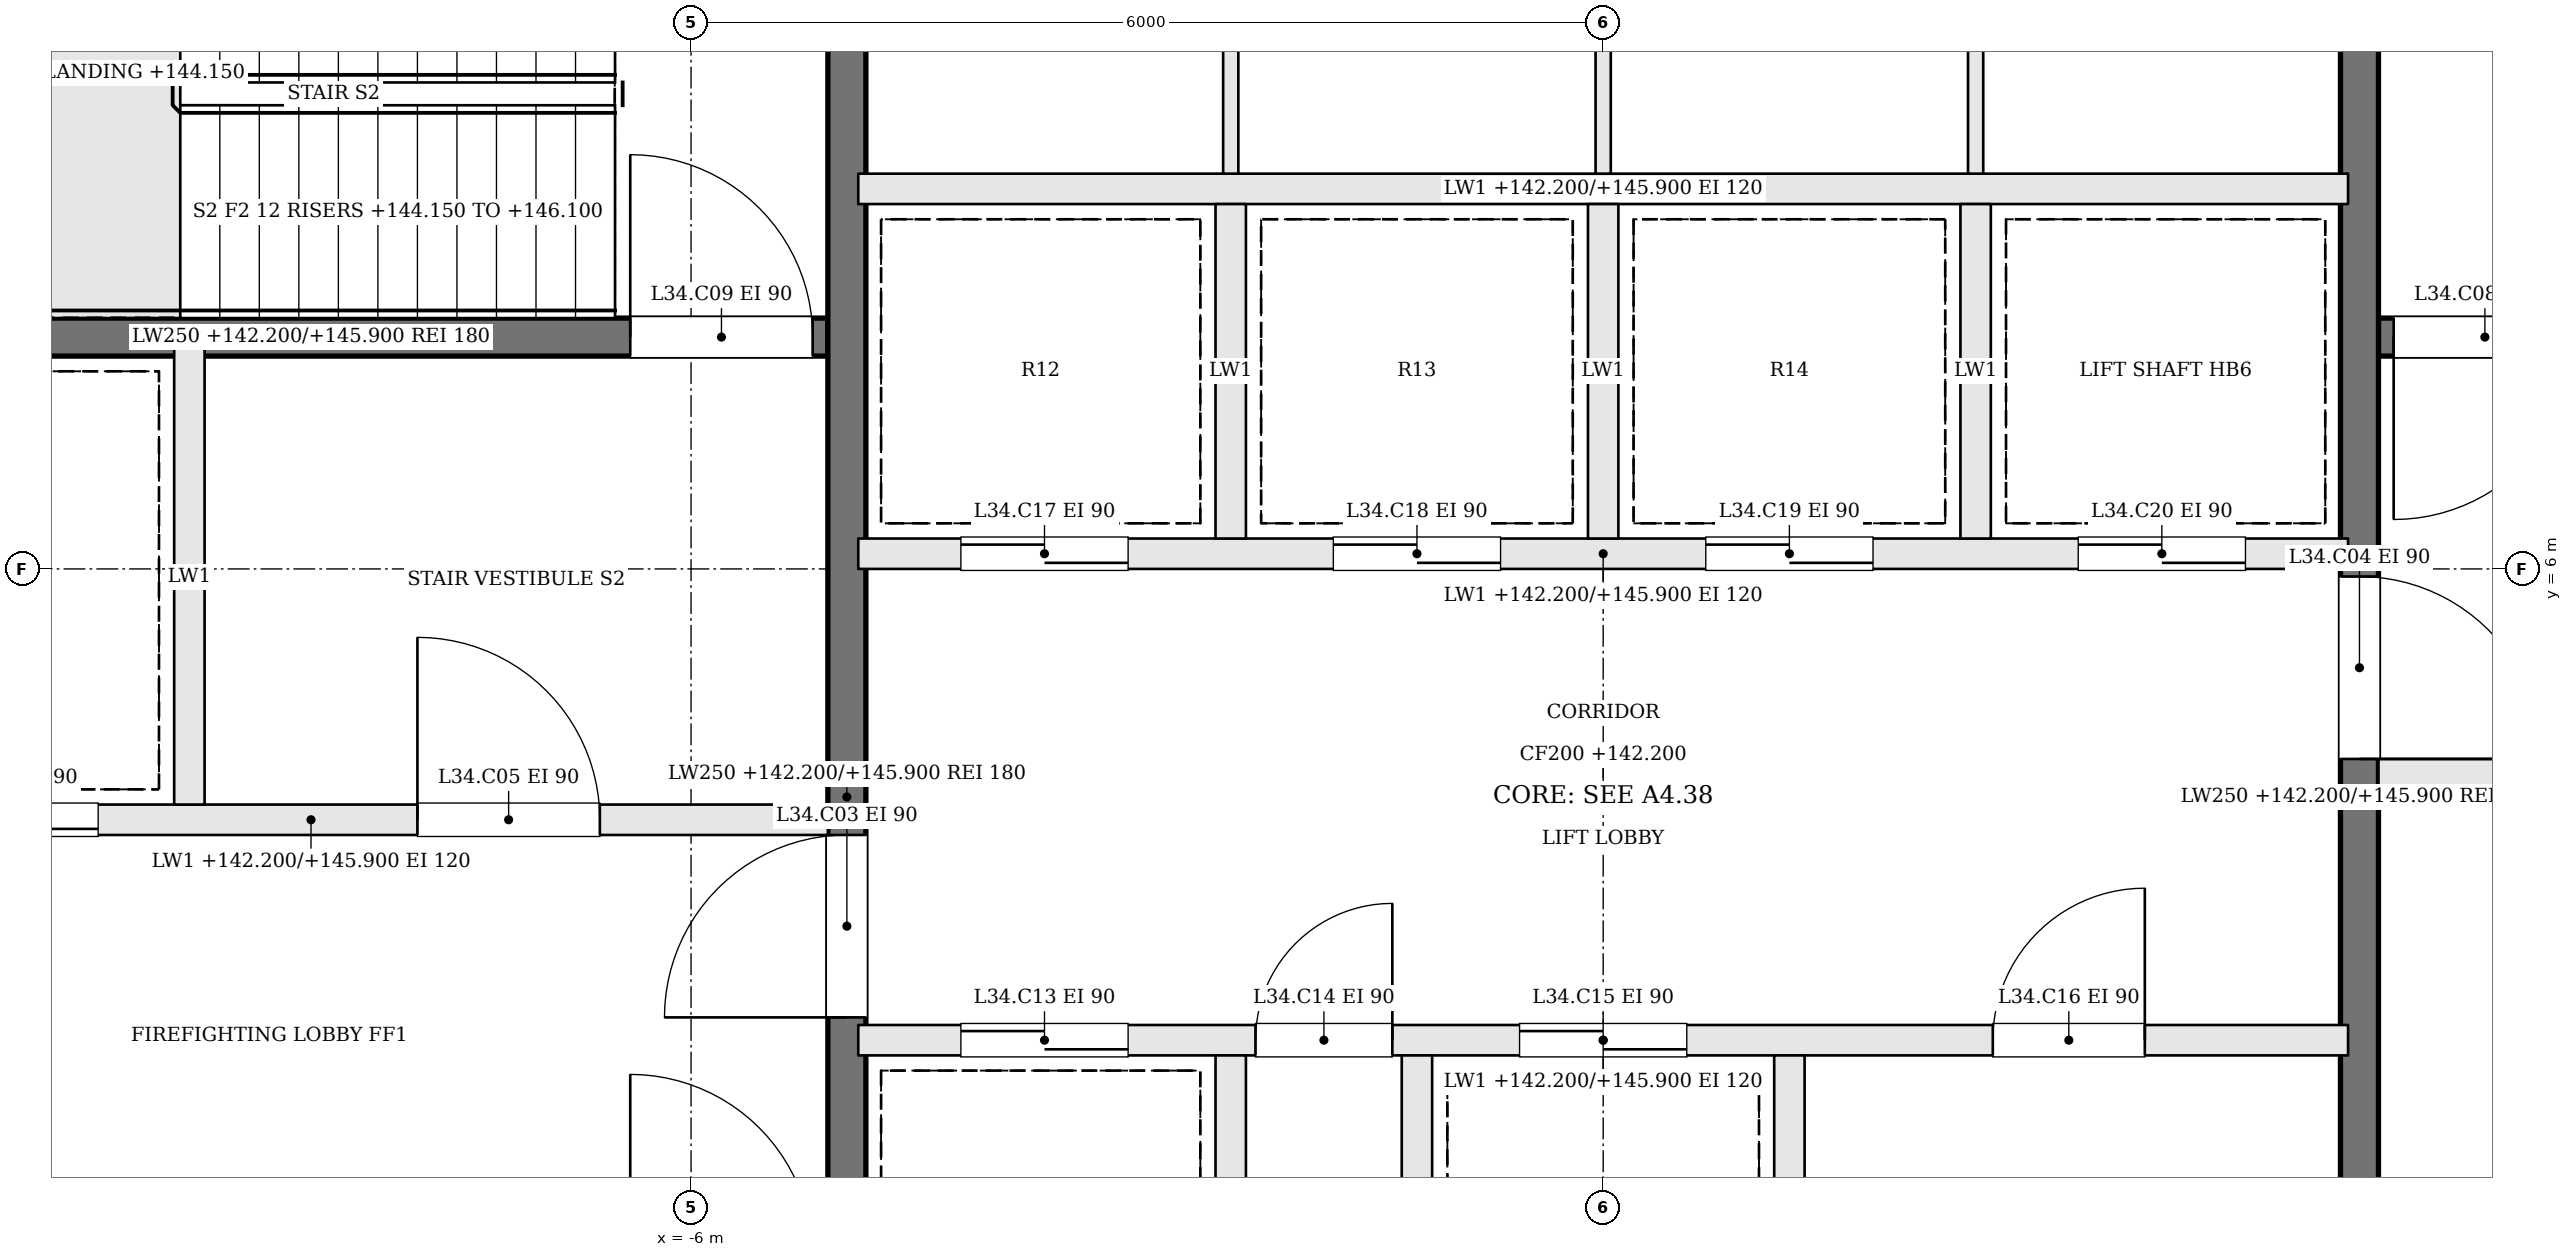
"""IFC4 building model, lengths in metres.
Left out: names, types, materials, properties, quantities, classifications, styles, units other than length and angle.
Written with IfcOpenShell. Run it as: python <this file> out.ifc"""

import sys

from ifc_helpers import new_model, si_unit, direction, frame, frame_2d, origin, place, context, subcontext, project, spatial, rectangle, extrude, element, fill, save


model = new_model("IFC4")
c1 = context("Model", 3, precision=1e-05, world=origin(), true_north=direction((0.0, 1.0)))
c2 = subcontext(c1, "Body", "Model", "MODEL_VIEW")
j1 = project(units=[si_unit("LENGTHUNIT", "METRE"), si_unit("PLANEANGLEUNIT", "RADIAN")], contexts=[c1])
p1 = place(None, origin())
s1 = spatial("IfcSite", under=j1, at=p1, CompositionType="ELEMENT")
p2 = place(p1, origin())
s2 = spatial("IfcBuilding", under=s1, at=p2, CompositionType="ELEMENT")
p3 = place(p2, frame((0.0, 0.0, 142.2)))
s3 = spatial("IfcBuildingStorey", under=s2, at=p3, CompositionType="ELEMENT", Elevation=142.2)
p4 = place(p3, frame((11.9, 7.525, 0.0), z_axis=(0.0, 0.0, 1.0), x_axis=(-1.0, 0.0, 0.0)))
e1 = element("IfcWall", 1, at=p4, inside=s3, PredefinedType="SOLIDWALL", context=c2, shape_type="SweptSolid", body=[
    extrude(rectangle(XDim=6.8, YDim=0.25, at=frame_2d((3.4, 0.0))), origin(), (0.0, 0.0, 1.0), 3.7),
])
p5 = place(p4, frame((5.5, 0.0, 0.0)))
e2 = element("IfcOpeningElement", 2, at=p5, cuts=e1, PredefinedType="OPENING", context=c2, shape_type="SweptSolid", body=[
    extrude(rectangle(XDim=1.2, YDim=2.1, at=frame_2d((0.6, 1.05))), frame((0.0, 0.135, 0.0), z_axis=(0.0, -1.0, 0.0), x_axis=(1.0, 0.0, 0.0)), (0.0, 0.0, 1.0), 0.27),
])
p6 = place(p3, frame((-11.9, 4.35, 0.0), z_axis=(0.0, 0.0, 1.0), x_axis=(1.0, 0.0, 0.0)))
e3 = element("IfcWall", 3, at=p6, inside=s3, PredefinedType="SOLIDWALL", context=c2, shape_type="SweptSolid", body=[
    extrude(rectangle(XDim=6.8, YDim=0.2, at=frame_2d((3.4, 0.0))), origin(), (0.0, 0.0, 1.0), 3.7),
])
p7 = place(p6, frame((4.1, 0.0, 0.0)))
e4 = element("IfcOpeningElement", 4, at=p7, cuts=e3, PredefinedType="OPENING", context=c2, shape_type="SweptSolid", body=[
    extrude(rectangle(XDim=1.2, YDim=2.1, at=frame_2d((0.6, 1.05))), frame((0.0, 0.11, 0.0), z_axis=(0.0, -1.0, 0.0), x_axis=(1.0, 0.0, 0.0)), (0.0, 0.0, 1.0), 0.22),
])
p8 = place(p6, frame((0.8, 0.0, 0.0)))
e5 = element("IfcOpeningElement", 5, at=p8, cuts=e3, PredefinedType="OPENING", context=c2, shape_type="SweptSolid", body=[
    extrude(rectangle(XDim=1.2, YDim=2.1, at=frame_2d((0.6, 1.05))), frame((0.0, 0.11, 0.0), z_axis=(0.0, -1.0, 0.0), x_axis=(1.0, 0.0, 0.0)), (0.0, 0.0, 1.0), 0.22),
])
p9 = place(p3, frame((11.9, 4.65, 0.0), z_axis=(0.0, 0.0, 1.0), x_axis=(-1.0, 0.0, 0.0)))
e6 = element("IfcWall", 6, at=p9, inside=s3, PredefinedType="SOLIDWALL", context=c2, shape_type="SweptSolid", body=[
    extrude(rectangle(XDim=6.8, YDim=0.2, at=frame_2d((3.4, 0.0))), origin(), (0.0, 0.0, 1.0), 3.7),
])
p10 = place(p9, frame((4.1, 0.0, 0.0)))
e7 = element("IfcOpeningElement", 7, at=p10, cuts=e6, PredefinedType="OPENING", context=c2, shape_type="SweptSolid", body=[
    extrude(rectangle(XDim=1.2, YDim=2.1, at=frame_2d((0.6, 1.05))), frame((0.0, 0.11, 0.0), z_axis=(0.0, -1.0, 0.0), x_axis=(1.0, 0.0, 0.0)), (0.0, 0.0, 1.0), 0.22),
])
p11 = place(p9, frame((0.8, 0.0, 0.0)))
e8 = element("IfcOpeningElement", 8, at=p11, cuts=e6, PredefinedType="OPENING", context=c2, shape_type="SweptSolid", body=[
    extrude(rectangle(XDim=1.2, YDim=2.1, at=frame_2d((0.6, 1.05))), frame((0.0, 0.11, 0.0), z_axis=(0.0, -1.0, 0.0), x_axis=(1.0, 0.0, 0.0)), (0.0, 0.0, 1.0), 0.22),
])
p12 = place(p3, frame((-11.9, 7.525, 0.0), z_axis=(0.0, 0.0, 1.0), x_axis=(1.0, 0.0, 0.0)))
e9 = element("IfcWall", 9, at=p12, inside=s3, PredefinedType="SOLIDWALL", context=c2, shape_type="SweptSolid", body=[
    extrude(rectangle(XDim=6.8, YDim=0.25, at=frame_2d((3.4, 0.0))), origin(), (0.0, 0.0, 1.0), 3.7),
])
p13 = place(p12, frame((5.5, 0.0, 0.0)))
e10 = element("IfcOpeningElement", 10, at=p13, cuts=e9, PredefinedType="OPENING", context=c2, shape_type="SweptSolid", body=[
    extrude(rectangle(XDim=1.2, YDim=2.1, at=frame_2d((0.6, 1.05))), frame((0.0, 0.135, 0.0), z_axis=(0.0, -1.0, 0.0), x_axis=(1.0, 0.0, 0.0)), (0.0, 0.0, 1.0), 0.27),
])
p14 = place(p3, frame((-9.3, 4.45, 0.0), z_axis=(0.0, 0.0, 1.0), x_axis=(0.0, 1.0, 0.0)))
e11 = element("IfcWall", 11, at=p14, inside=s3, PredefinedType="SOLIDWALL", context=c2, shape_type="SweptSolid", body=[
    extrude(rectangle(XDim=3.0, YDim=0.2, at=frame_2d((1.5, 0.0))), origin(), (0.0, 0.0, 1.0), 3.7),
])
p15 = place(p3, frame((-4.975, -1.9, 0.0), z_axis=(0.0, 0.0, 1.0), x_axis=(0.0, 1.0, 0.0)))
e12 = element("IfcWall", 12, at=p15, inside=s3, PredefinedType="SOLIDWALL", context=c2, shape_type="SweptSolid", body=[
    extrude(rectangle(XDim=12.8, YDim=0.25, at=frame_2d((6.4, 0.0))), origin(), (0.0, 0.0, 1.0), 3.7),
])
p16 = place(p15, frame((4.95, 0.0, 0.0)))
e13 = element("IfcOpeningElement", 13, at=p16, cuts=e12, PredefinedType="OPENING", context=c2, shape_type="SweptSolid", body=[
    extrude(rectangle(XDim=1.2, YDim=2.1, at=frame_2d((0.6, 1.05))), frame((0.0, 0.135, 0.0), z_axis=(0.0, -1.0, 0.0), x_axis=(1.0, 0.0, 0.0)), (0.0, 0.0, 1.0), 0.27),
])
p17 = place(p3, frame((4.975, 10.9, 0.0), z_axis=(0.0, 0.0, 1.0), x_axis=(0.0, -1.0, 0.0)))
e14 = element("IfcWall", 14, at=p17, inside=s3, PredefinedType="SOLIDWALL", context=c2, shape_type="SweptSolid", body=[
    extrude(rectangle(XDim=12.8, YDim=0.25, at=frame_2d((6.4, 0.0))), origin(), (0.0, 0.0, 1.0), 3.7),
])
p18 = place(p17, frame((4.95, 0.0, 0.0)))
e15 = element("IfcOpeningElement", 15, at=p18, cuts=e14, PredefinedType="OPENING", context=c2, shape_type="SweptSolid", body=[
    extrude(rectangle(XDim=1.2, YDim=2.1, at=frame_2d((0.6, 1.05))), frame((0.0, 0.135, 0.0), z_axis=(0.0, -1.0, 0.0), x_axis=(1.0, 0.0, 0.0)), (0.0, 0.0, 1.0), 0.27),
])
p19 = place(p3, frame((-4.9, 2.9, 0.0), z_axis=(0.0, 0.0, 1.0), x_axis=(1.0, 0.0, 0.0)))
e16 = element("IfcWall", 16, at=p19, inside=s3, PredefinedType="SOLIDWALL", context=c2, shape_type="SweptSolid", body=[
    extrude(rectangle(XDim=9.8, YDim=0.2, at=frame_2d((4.9, 0.0))), origin(), (0.0, 0.0, 1.0), 3.7),
])
p20 = place(p19, frame((0.675, 0.0, 0.0)))
e17 = element("IfcOpeningElement", 17, at=p20, cuts=e16, PredefinedType="OPENING", context=c2, shape_type="SweptSolid", body=[
    extrude(rectangle(XDim=1.1, YDim=2.1, at=frame_2d((0.55, 1.05))), frame((0.0, 0.11, 0.0), z_axis=(0.0, -1.0, 0.0), x_axis=(1.0, 0.0, 0.0)), (0.0, 0.0, 1.0), 0.22),
])
p21 = place(p19, frame((2.613, 0.0, 0.0)))
e18 = element("IfcOpeningElement", 18, at=p21, cuts=e16, PredefinedType="OPENING", context=c2, shape_type="SweptSolid", body=[
    extrude(rectangle(XDim=0.9, YDim=2.1, at=frame_2d((0.45, 1.05))), frame((0.0, 0.11, 0.0), z_axis=(0.0, -1.0, 0.0), x_axis=(1.0, 0.0, 0.0)), (0.0, 0.0, 1.0), 0.22),
])
p22 = place(p19, frame((4.35, 0.0, 0.0)))
e19 = element("IfcOpeningElement", 19, at=p22, cuts=e16, PredefinedType="OPENING", context=c2, shape_type="SweptSolid", body=[
    extrude(rectangle(XDim=1.1, YDim=2.1, at=frame_2d((0.55, 1.05))), frame((0.0, 0.11, 0.0), z_axis=(0.0, -1.0, 0.0), x_axis=(1.0, 0.0, 0.0)), (0.0, 0.0, 1.0), 0.22),
])
p23 = place(p19, frame((7.463, 0.0, 0.0)))
e20 = element("IfcOpeningElement", 20, at=p23, cuts=e16, PredefinedType="OPENING", context=c2, shape_type="SweptSolid", body=[
    extrude(rectangle(XDim=1.0, YDim=2.1, at=frame_2d((0.5, 1.05))), frame((0.0, 0.11, 0.0), z_axis=(0.0, -1.0, 0.0), x_axis=(1.0, 0.0, 0.0)), (0.0, 0.0, 1.0), 0.22),
])
p24 = place(p3, frame((-4.9, 6.1, 0.0), z_axis=(0.0, 0.0, 1.0), x_axis=(1.0, 0.0, 0.0)))
e21 = element("IfcWall", 21, at=p24, inside=s3, PredefinedType="SOLIDWALL", context=c2, shape_type="SweptSolid", body=[
    extrude(rectangle(XDim=9.8, YDim=0.2, at=frame_2d((4.9, 0.0))), origin(), (0.0, 0.0, 1.0), 3.7),
])
p25 = place(p24, frame((0.675, 0.0, 0.0)))
e22 = element("IfcOpeningElement", 22, at=p25, cuts=e21, PredefinedType="OPENING", context=c2, shape_type="SweptSolid", body=[
    extrude(rectangle(XDim=1.1, YDim=2.1, at=frame_2d((0.55, 1.05))), frame((0.0, 0.11, 0.0), z_axis=(0.0, -1.0, 0.0), x_axis=(1.0, 0.0, 0.0)), (0.0, 0.0, 1.0), 0.22),
])
p26 = place(p24, frame((3.125, 0.0, 0.0)))
e23 = element("IfcOpeningElement", 23, at=p26, cuts=e21, PredefinedType="OPENING", context=c2, shape_type="SweptSolid", body=[
    extrude(rectangle(XDim=1.1, YDim=2.1, at=frame_2d((0.55, 1.05))), frame((0.0, 0.11, 0.0), z_axis=(0.0, -1.0, 0.0), x_axis=(1.0, 0.0, 0.0)), (0.0, 0.0, 1.0), 0.22),
])
p27 = place(p24, frame((5.575, 0.0, 0.0)))
e24 = element("IfcOpeningElement", 24, at=p27, cuts=e21, PredefinedType="OPENING", context=c2, shape_type="SweptSolid", body=[
    extrude(rectangle(XDim=1.1, YDim=2.1, at=frame_2d((0.55, 1.05))), frame((0.0, 0.11, 0.0), z_axis=(0.0, -1.0, 0.0), x_axis=(1.0, 0.0, 0.0)), (0.0, 0.0, 1.0), 0.22),
])
p28 = place(p24, frame((8.025, 0.0, 0.0)))
e25 = element("IfcOpeningElement", 25, at=p28, cuts=e21, PredefinedType="OPENING", context=c2, shape_type="SweptSolid", body=[
    extrude(rectangle(XDim=1.1, YDim=2.1, at=frame_2d((0.55, 1.05))), frame((0.0, 0.11, 0.0), z_axis=(0.0, -1.0, 0.0), x_axis=(1.0, 0.0, 0.0)), (0.0, 0.0, 1.0), 0.22),
])
p29 = place(p3, frame((-4.9, 8.5, 0.0), z_axis=(0.0, 0.0, 1.0), x_axis=(1.0, 0.0, 0.0)))
e26 = element("IfcWall", 26, at=p29, inside=s3, PredefinedType="SOLIDWALL", context=c2, shape_type="SweptSolid", body=[
    extrude(rectangle(XDim=9.8, YDim=0.2, at=frame_2d((4.9, 0.0))), origin(), (0.0, 0.0, 1.0), 3.7),
])
for number, where, z_axis, x_axis in (
    (27, (-2.45, 0.6, 0.0), (0.0, 0.0, 1.0), (0.0, 1.0, 0.0)),
    (28, (-1.225, 0.6, 0.0), (0.0, 0.0, 1.0), (0.0, 1.0, 0.0)),
    (29, (1.225, 0.6, 0.0), (0.0, 0.0, 1.0), (0.0, 1.0, 0.0)),
    (30, (-2.45, 6.2, 0.0), (0.0, 0.0, 1.0), (0.0, 1.0, 0.0)),
    (31, (0.0, 6.2, 0.0), (0.0, 0.0, 1.0), (0.0, 1.0, 0.0)),
    (32, (2.45, 6.2, 0.0), (0.0, 0.0, 1.0), (0.0, 1.0, 0.0)),
):
    element("IfcWall", number, at=place(p3, frame(where, z_axis=z_axis, x_axis=x_axis)), inside=s3, PredefinedType="SOLIDWALL", context=c2, shape_type="SweptSolid", body=[
        extrude(rectangle(XDim=2.2, YDim=0.2, at=frame_2d((1.1, 0.0))), origin(), (0.0, 0.0, 1.0), 3.7),
    ])
for number, where, z_axis, x_axis in (
    (33, (-2.45, 8.6, 0.0), (0.0, 0.0, 1.0), (0.0, 1.0, 0.0)),
    (34, (0.0, 8.6, 0.0), (0.0, 0.0, 1.0), (0.0, 1.0, 0.0)),
    (35, (2.45, 8.6, 0.0), (0.0, 0.0, 1.0), (0.0, 1.0, 0.0)),
):
    element("IfcWall", number, at=place(p3, frame(where, z_axis=z_axis, x_axis=x_axis)), inside=s3, PredefinedType="PARTITIONING", context=c2, shape_type="SweptSolid", body=[
        extrude(rectangle(XDim=2.3, YDim=0.1, at=frame_2d((1.15, 0.0))), origin(), (0.0, 0.0, 1.0), 3.7),
    ])
p30 = place(p16, origin())
e36 = element("IfcDoor", 36, at=p30, inside=s3, OperationType="SINGLE_SWING_LEFT", PredefinedType="DOOR", context=c2, shape_type="SweptSolid", body=[
    extrude(rectangle(XDim=1.2, YDim=2.1, at=frame_2d((0.6, 1.05))), frame((0.0, 0.025, 0.0), z_axis=(0.0, -1.0, 0.0), x_axis=(1.0, 0.0, 0.0)), (0.0, 0.0, 1.0), 0.05),
])
fill(e13, e36)
p31 = place(p18, origin())
e37 = element("IfcDoor", 37, at=p31, inside=s3, OperationType="SINGLE_SWING_RIGHT", PredefinedType="DOOR", context=c2, shape_type="SweptSolid", body=[
    extrude(rectangle(XDim=1.2, YDim=2.1, at=frame_2d((0.6, 1.05))), frame((0.0, 0.025, 0.0), z_axis=(0.0, -1.0, 0.0), x_axis=(1.0, 0.0, 0.0)), (0.0, 0.0, 1.0), 0.05),
])
fill(e15, e37)
p32 = place(p7, origin())
e38 = element("IfcDoor", 38, at=p32, inside=s3, OperationType="SINGLE_SWING_LEFT", PredefinedType="DOOR", context=c2, shape_type="SweptSolid", body=[
    extrude(rectangle(XDim=1.2, YDim=2.1, at=frame_2d((0.6, 1.05))), frame((0.0, 0.025, 0.0), z_axis=(0.0, -1.0, 0.0), x_axis=(1.0, 0.0, 0.0)), (0.0, 0.0, 1.0), 0.05),
])
fill(e4, e38)
p33 = place(p5, origin())
e39 = element("IfcDoor", 39, at=p33, inside=s3, OperationType="SINGLE_SWING_RIGHT", PredefinedType="DOOR", context=c2, shape_type="SweptSolid", body=[
    extrude(rectangle(XDim=1.2, YDim=2.1, at=frame_2d((0.6, 1.05))), frame((0.0, 0.025, 0.0), z_axis=(0.0, -1.0, 0.0), x_axis=(1.0, 0.0, 0.0)), (0.0, 0.0, 1.0), 0.05),
])
fill(e2, e39)
p34 = place(p13, origin())
e40 = element("IfcDoor", 40, at=p34, inside=s3, OperationType="SINGLE_SWING_LEFT", PredefinedType="DOOR", context=c2, shape_type="SweptSolid", body=[
    extrude(rectangle(XDim=1.2, YDim=2.1, at=frame_2d((0.6, 1.05))), frame((0.0, 0.025, 0.0), z_axis=(0.0, -1.0, 0.0), x_axis=(1.0, 0.0, 0.0)), (0.0, 0.0, 1.0), 0.05),
])
fill(e10, e40)
p35 = place(p8, origin())
e41 = element("IfcDoor", 41, at=p35, inside=s3, OperationType="SLIDING_TO_RIGHT", PredefinedType="DOOR", context=c2, shape_type="SweptSolid", body=[
    extrude(rectangle(XDim=1.2, YDim=2.1, at=frame_2d((0.6, 1.05))), frame((0.0, 0.025, 0.0), z_axis=(0.0, -1.0, 0.0), x_axis=(1.0, 0.0, 0.0)), (0.0, 0.0, 1.0), 0.05),
])
fill(e5, e41)
p36 = place(p20, origin())
e42 = element("IfcDoor", 42, at=p36, inside=s3, OperationType="SLIDING_TO_RIGHT", PredefinedType="DOOR", context=c2, shape_type="SweptSolid", body=[
    extrude(rectangle(XDim=1.1, YDim=2.1, at=frame_2d((0.55, 1.05))), frame((0.0, 0.025, 0.0), z_axis=(0.0, -1.0, 0.0), x_axis=(1.0, 0.0, 0.0)), (0.0, 0.0, 1.0), 0.05),
])
fill(e17, e42)
p37 = place(p21, origin())
e43 = element("IfcDoor", 43, at=p37, inside=s3, OperationType="SINGLE_SWING_RIGHT", PredefinedType="DOOR", context=c2, shape_type="SweptSolid", body=[
    extrude(rectangle(XDim=0.9, YDim=2.1, at=frame_2d((0.45, 1.05))), frame((0.0, 0.025, 0.0), z_axis=(0.0, -1.0, 0.0), x_axis=(1.0, 0.0, 0.0)), (0.0, 0.0, 1.0), 0.05),
])
fill(e18, e43)
p38 = place(p22, origin())
e44 = element("IfcDoor", 44, at=p38, inside=s3, OperationType="SLIDING_TO_LEFT", PredefinedType="DOOR", context=c2, shape_type="SweptSolid", body=[
    extrude(rectangle(XDim=1.1, YDim=2.1, at=frame_2d((0.55, 1.05))), frame((0.0, 0.025, 0.0), z_axis=(0.0, -1.0, 0.0), x_axis=(1.0, 0.0, 0.0)), (0.0, 0.0, 1.0), 0.05),
])
fill(e19, e44)
p39 = place(p23, origin())
e45 = element("IfcDoor", 45, at=p39, inside=s3, OperationType="SINGLE_SWING_RIGHT", PredefinedType="DOOR", context=c2, shape_type="SweptSolid", body=[
    extrude(rectangle(XDim=1.0, YDim=2.1, at=frame_2d((0.5, 1.05))), frame((0.0, 0.025, 0.0), z_axis=(0.0, -1.0, 0.0), x_axis=(1.0, 0.0, 0.0)), (0.0, 0.0, 1.0), 0.05),
])
fill(e20, e45)
p40 = place(p25, origin())
e46 = element("IfcDoor", 46, at=p40, inside=s3, OperationType="SLIDING_TO_RIGHT", PredefinedType="DOOR", context=c2, shape_type="SweptSolid", body=[
    extrude(rectangle(XDim=1.1, YDim=2.1, at=frame_2d((0.55, 1.05))), frame((0.0, 0.025, 0.0), z_axis=(0.0, -1.0, 0.0), x_axis=(1.0, 0.0, 0.0)), (0.0, 0.0, 1.0), 0.05),
])
fill(e22, e46)
p41 = place(p26, origin())
e47 = element("IfcDoor", 47, at=p41, inside=s3, OperationType="SLIDING_TO_LEFT", PredefinedType="DOOR", context=c2, shape_type="SweptSolid", body=[
    extrude(rectangle(XDim=1.1, YDim=2.1, at=frame_2d((0.55, 1.05))), frame((0.0, 0.025, 0.0), z_axis=(0.0, -1.0, 0.0), x_axis=(1.0, 0.0, 0.0)), (0.0, 0.0, 1.0), 0.05),
])
fill(e23, e47)
p42 = place(p27, origin())
e48 = element("IfcDoor", 48, at=p42, inside=s3, OperationType="SLIDING_TO_RIGHT", PredefinedType="DOOR", context=c2, shape_type="SweptSolid", body=[
    extrude(rectangle(XDim=1.1, YDim=2.1, at=frame_2d((0.55, 1.05))), frame((0.0, 0.025, 0.0), z_axis=(0.0, -1.0, 0.0), x_axis=(1.0, 0.0, 0.0)), (0.0, 0.0, 1.0), 0.05),
])
fill(e24, e48)
p43 = place(p28, origin())
e49 = element("IfcDoor", 49, at=p43, inside=s3, OperationType="SLIDING_TO_LEFT", PredefinedType="DOOR", context=c2, shape_type="SweptSolid", body=[
    extrude(rectangle(XDim=1.1, YDim=2.1, at=frame_2d((0.55, 1.05))), frame((0.0, 0.025, 0.0), z_axis=(0.0, -1.0, 0.0), x_axis=(1.0, 0.0, 0.0)), (0.0, 0.0, 1.0), 0.05),
])
fill(e25, e49)
save(model, sys.argv[1])
